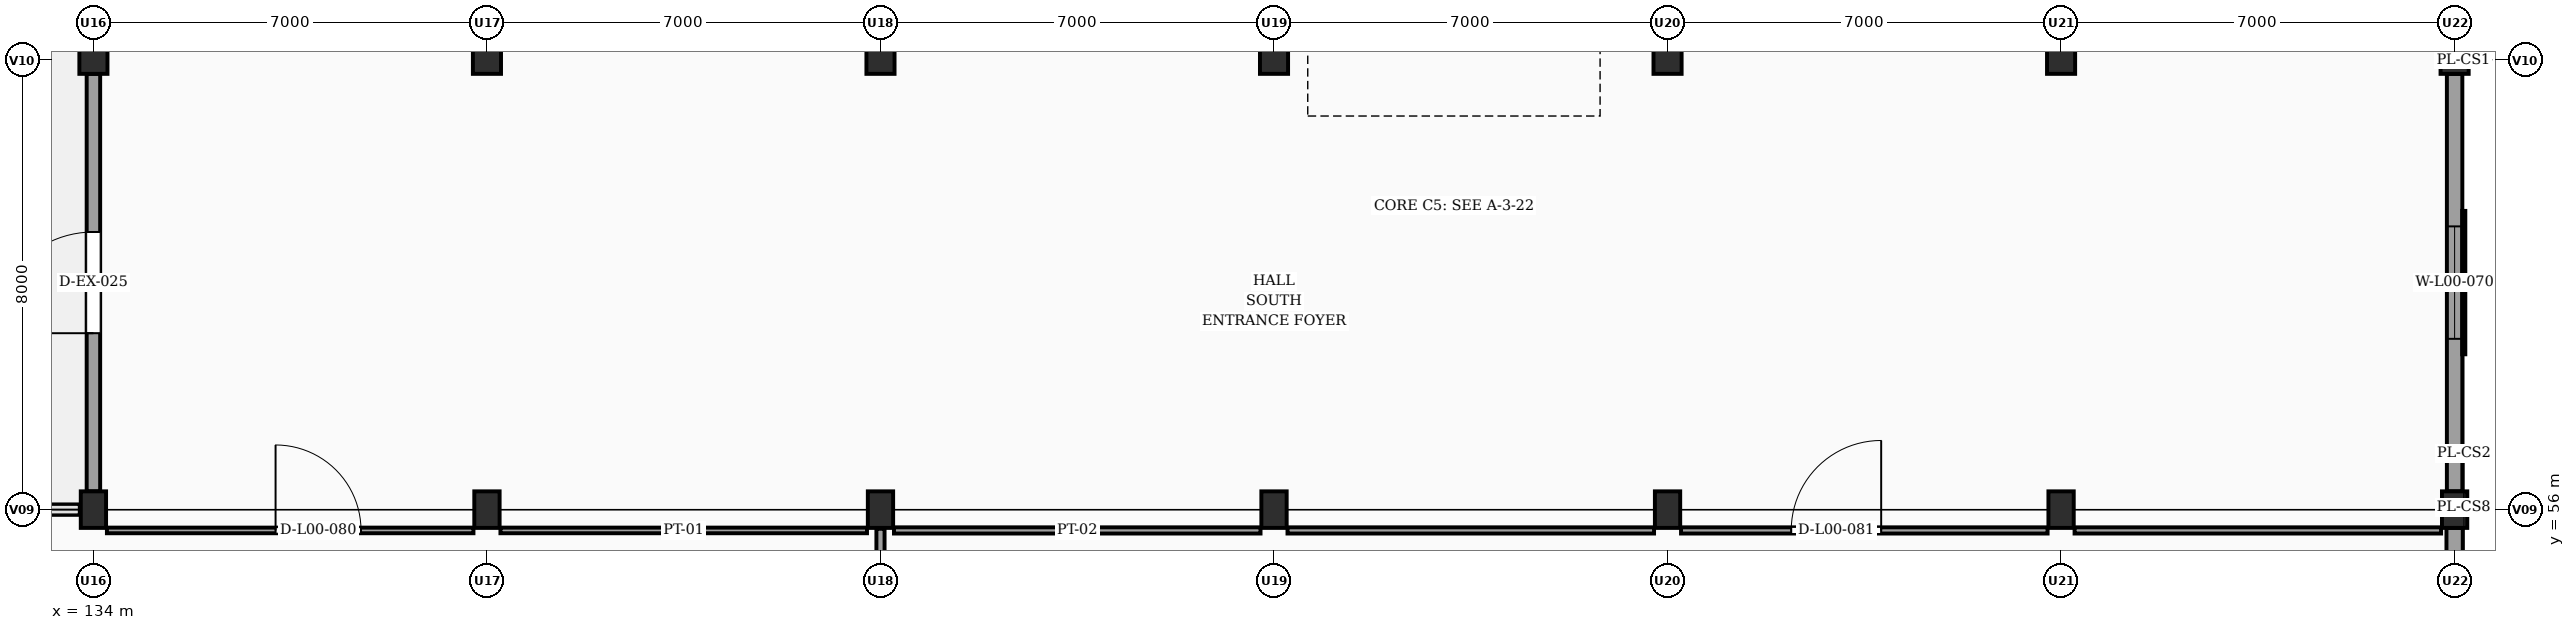
"""IFC4 building model, lengths in metres.
Left out: names, types, materials, properties, quantities, classifications, styles, units other than length and angle.
Written with IfcOpenShell. Run it as: python <this file> out.ifc"""

import sys

from ifc_helpers import new_model, si_unit, direction, frame, frame_2d, origin, origin_2d, place, context, subcontext, project, spatial, rectangle, extrude, element, fill, save


model = new_model("IFC4")
c1 = context("Model", 3, precision=1e-05, world=origin(), true_north=direction((0.0, 1.0)))
c2 = subcontext(c1, "Body", "Model", "MODEL_VIEW")
j1 = project(units=[si_unit("LENGTHUNIT", "METRE"), si_unit("PLANEANGLEUNIT", "RADIAN")], contexts=[c1])
p1 = place(None, origin())
s1 = spatial("IfcSite", under=j1, at=p1, CompositionType="ELEMENT")
p2 = place(p1, origin())
s2 = spatial("IfcBuilding", under=s1, at=p2, CompositionType="ELEMENT")
p3 = place(p2, origin())
s3 = spatial("IfcBuildingStorey", under=s2, at=p3, CompositionType="ELEMENT", Elevation=0.0)
p4 = place(p3, frame((134.0, 56.0, -0.2), z_axis=(0.0, 0.0, 1.0), x_axis=(1.0, 0.0, 0.0)))
e1 = element("IfcColumn", 1, at=p4, inside=s3, PredefinedType="COLUMN", context=c2, shape_type="SweptSolid", body=[
    extrude(rectangle(XDim=0.45, YDim=0.65, at=origin_2d()), origin(), (0.0, 0.0, 1.0), 4.7),
])
p5 = place(p3, frame((134.0, 64.0, -0.2), z_axis=(0.0, 0.0, 1.0), x_axis=(1.0, 0.0, 0.0)))
e2 = element("IfcColumn", 2, at=p5, inside=s3, PredefinedType="COLUMN", context=c2, shape_type="SweptSolid", body=[
    extrude(rectangle(XDim=0.5, YDim=0.5, at=origin_2d()), origin(), (0.0, 0.0, 1.0), 4.7),
])
p6 = place(p3, frame((141.0, 56.0, -0.2), z_axis=(0.0, 0.0, 1.0), x_axis=(1.0, 0.0, 0.0)))
e3 = element("IfcColumn", 3, at=p6, inside=s3, PredefinedType="COLUMN", context=c2, shape_type="SweptSolid", body=[
    extrude(rectangle(XDim=0.45, YDim=0.65, at=origin_2d()), origin(), (0.0, 0.0, 1.0), 4.7),
])
p7 = place(p3, frame((141.0, 64.0, -0.2), z_axis=(0.0, 0.0, 1.0), x_axis=(1.0, 0.0, 0.0)))
e4 = element("IfcColumn", 4, at=p7, inside=s3, PredefinedType="COLUMN", context=c2, shape_type="SweptSolid", body=[
    extrude(rectangle(XDim=0.5, YDim=0.5, at=origin_2d()), origin(), (0.0, 0.0, 1.0), 4.7),
])
p8 = place(p3, frame((148.0, 56.0, -0.2), z_axis=(0.0, 0.0, 1.0), x_axis=(1.0, 0.0, 0.0)))
e5 = element("IfcColumn", 5, at=p8, inside=s3, PredefinedType="COLUMN", context=c2, shape_type="SweptSolid", body=[
    extrude(rectangle(XDim=0.45, YDim=0.65, at=origin_2d()), origin(), (0.0, 0.0, 1.0), 4.7),
])
p9 = place(p3, frame((148.0, 64.0, -0.2), z_axis=(0.0, 0.0, 1.0), x_axis=(1.0, 0.0, 0.0)))
e6 = element("IfcColumn", 6, at=p9, inside=s3, PredefinedType="COLUMN", context=c2, shape_type="SweptSolid", body=[
    extrude(rectangle(XDim=0.5, YDim=0.5, at=origin_2d()), origin(), (0.0, 0.0, 1.0), 4.7),
])
p10 = place(p3, frame((155.0, 56.0, -0.2), z_axis=(0.0, 0.0, 1.0), x_axis=(1.0, 0.0, 0.0)))
e7 = element("IfcColumn", 7, at=p10, inside=s3, PredefinedType="COLUMN", context=c2, shape_type="SweptSolid", body=[
    extrude(rectangle(XDim=0.45, YDim=0.65, at=origin_2d()), origin(), (0.0, 0.0, 1.0), 4.7),
])
p11 = place(p3, frame((155.0, 64.0, -0.2), z_axis=(0.0, 0.0, 1.0), x_axis=(1.0, 0.0, 0.0)))
e8 = element("IfcColumn", 8, at=p11, inside=s3, PredefinedType="COLUMN", context=c2, shape_type="SweptSolid", body=[
    extrude(rectangle(XDim=0.5, YDim=0.5, at=origin_2d()), origin(), (0.0, 0.0, 1.0), 4.7),
])
p12 = place(p3, frame((162.0, 56.0, -0.2), z_axis=(0.0, 0.0, 1.0), x_axis=(1.0, 0.0, 0.0)))
e9 = element("IfcColumn", 9, at=p12, inside=s3, PredefinedType="COLUMN", context=c2, shape_type="SweptSolid", body=[
    extrude(rectangle(XDim=0.45, YDim=0.65, at=origin_2d()), origin(), (0.0, 0.0, 1.0), 4.7),
])
p13 = place(p3, frame((162.0, 64.0, -0.2), z_axis=(0.0, 0.0, 1.0), x_axis=(1.0, 0.0, 0.0)))
e10 = element("IfcColumn", 10, at=p13, inside=s3, PredefinedType="COLUMN", context=c2, shape_type="SweptSolid", body=[
    extrude(rectangle(XDim=0.5, YDim=0.5, at=origin_2d()), origin(), (0.0, 0.0, 1.0), 4.7),
])
p14 = place(p3, frame((169.0, 56.0, -0.2), z_axis=(0.0, 0.0, 1.0), x_axis=(1.0, 0.0, 0.0)))
e11 = element("IfcColumn", 11, at=p14, inside=s3, PredefinedType="COLUMN", context=c2, shape_type="SweptSolid", body=[
    extrude(rectangle(XDim=0.45, YDim=0.65, at=origin_2d()), origin(), (0.0, 0.0, 1.0), 4.7),
])
p15 = place(p3, frame((169.0, 64.0, -0.2), z_axis=(0.0, 0.0, 1.0), x_axis=(1.0, 0.0, 0.0)))
e12 = element("IfcColumn", 12, at=p15, inside=s3, PredefinedType="COLUMN", context=c2, shape_type="SweptSolid", body=[
    extrude(rectangle(XDim=0.5, YDim=0.5, at=origin_2d()), origin(), (0.0, 0.0, 1.0), 4.7),
])
p16 = place(p3, frame((176.0, 56.0, -0.2), z_axis=(0.0, 0.0, 1.0), x_axis=(1.0, 0.0, 0.0)))
e13 = element("IfcColumn", 13, at=p16, inside=s3, PredefinedType="COLUMN", context=c2, shape_type="SweptSolid", body=[
    extrude(rectangle(XDim=0.45, YDim=0.65, at=origin_2d()), origin(), (0.0, 0.0, 1.0), 4.7),
])
p17 = place(p3, frame((176.0, 64.0, -0.2), z_axis=(0.0, 0.0, 1.0), x_axis=(1.0, 0.0, 0.0)))
e14 = element("IfcColumn", 14, at=p17, inside=s3, PredefinedType="COLUMN", context=c2, shape_type="SweptSolid", body=[
    extrude(rectangle(XDim=0.5, YDim=0.5, at=origin_2d()), origin(), (0.0, 0.0, 1.0), 4.7),
])
p18 = place(p3, frame((176.0, 55.675, 0.0), z_axis=(0.0, 0.0, 1.0), x_axis=(0.0, -1.0, 0.0)))
e15 = element("IfcWall", 15, at=p18, inside=s3, PredefinedType="SOLIDWALL", context=c2, shape_type="SweptSolid", body=[
    extrude(rectangle(XDim=5.35, YDim=0.29, at=frame_2d((2.675, 0.0))), origin(), (0.0, 0.0, 1.0), 3.54),
])
p19 = place(p18, frame((1.7, 0.0, 0.95)))
e16 = element("IfcOpeningElement", 16, at=p19, cuts=e15, PredefinedType="OPENING", context=c2, shape_type="SweptSolid", body=[
    extrude(rectangle(XDim=1.95, YDim=1.4, at=frame_2d((0.975, 0.7))), frame((0.0, 0.155, 0.0), z_axis=(0.0, -1.0, 0.0), x_axis=(1.0, 0.0, 0.0)), (0.0, 0.0, 1.0), 0.31),
])
p20 = place(p3, frame((127.225, 56.0, 0.0), z_axis=(0.0, 0.0, 1.0), x_axis=(1.0, 0.0, 0.0)))
e17 = element("IfcWall", 17, at=p20, inside=s3, PredefinedType="SOLIDWALL", context=c2, shape_type="SweptSolid", body=[
    extrude(rectangle(XDim=6.55, YDim=0.185, at=frame_2d((3.275, 0.0))), origin(), (0.0, 0.0, 1.0), 0.95),
])
p21 = place(p3, frame((134.0, 56.325, 0.0), z_axis=(0.0, 0.0, 1.0), x_axis=(0.0, 1.0, 0.0)))
e18 = element("IfcWall", 18, at=p21, inside=s3, PredefinedType="SOLIDWALL", context=c2, shape_type="SweptSolid", body=[
    extrude(rectangle(XDim=7.425, YDim=0.24, at=frame_2d((3.712, 0.0))), origin(), (0.0, 0.0, 1.0), 3.565),
])
p22 = place(p21, frame((2.812, 0.0, 0.0)))
e19 = element("IfcOpeningElement", 19, at=p22, cuts=e18, PredefinedType="OPENING", context=c2, shape_type="SweptSolid", body=[
    extrude(rectangle(XDim=1.8, YDim=2.2, at=frame_2d((0.9, 1.1))), frame((0.0, 0.13, 0.0), z_axis=(0.0, -1.0, 0.0), x_axis=(1.0, 0.0, 0.0)), (0.0, 0.0, 1.0), 0.26),
])
p23 = place(p3, frame((176.0, 63.75, 0.0), z_axis=(0.0, 0.0, 1.0), x_axis=(0.0, -1.0, 0.0)))
e20 = element("IfcWall", 20, at=p23, inside=s3, PredefinedType="SOLIDWALL", context=c2, shape_type="SweptSolid", body=[
    extrude(rectangle(XDim=7.425, YDim=0.275, at=frame_2d((3.712, 0.0))), origin(), (0.0, 0.0, 1.0), 3.515),
])
p24 = place(p23, frame((2.712, 0.0, 0.95)))
e21 = element("IfcOpeningElement", 21, at=p24, cuts=e20, PredefinedType="OPENING", context=c2, shape_type="SweptSolid", body=[
    extrude(rectangle(XDim=2.0, YDim=1.5, at=frame_2d((1.0, 0.75))), frame((0.0, 0.147, 0.0), z_axis=(0.0, -1.0, 0.0), x_axis=(1.0, 0.0, 0.0)), (0.0, 0.0, 1.0), 0.295),
])
p25 = place(p3, frame((148.0, 50.0, 0.0), z_axis=(0.0, 0.0, 1.0), x_axis=(0.0, 1.0, 0.0)))
e22 = element("IfcWall", 22, at=p25, inside=s3, PredefinedType="MOVABLE", context=c2, shape_type="SweptSolid", body=[
    extrude(rectangle(XDim=5.66, YDim=0.145, at=frame_2d((2.83, 0.0))), origin(), (0.0, 0.0, 1.0), 8.8),
])
p26 = place(p3, frame((134.24, 55.63, 0.0), z_axis=(0.0, 0.0, 1.0), x_axis=(1.0, 0.0, 0.0)))
e23 = element("IfcWall", 23, at=p26, inside=s3, PredefinedType="PARTITIONING", context=c2, shape_type="SweptSolid", body=[
    extrude(rectangle(XDim=6.52, YDim=0.1, at=frame_2d((3.26, 0.0))), origin(), (0.0, 0.0, 1.0), 3.565),
])
p27 = place(p26, frame((3.0, 0.0, 0.0)))
e24 = element("IfcOpeningElement", 24, at=p27, cuts=e23, PredefinedType="OPENING", context=c2, shape_type="SweptSolid", body=[
    extrude(rectangle(XDim=1.52, YDim=2.2, at=frame_2d((0.76, 1.1))), frame((0.0, 0.06, 0.0), z_axis=(0.0, -1.0, 0.0), x_axis=(1.0, 0.0, 0.0)), (0.0, 0.0, 1.0), 0.12),
])
p28 = place(p3, frame((141.24, 55.63, 0.0), z_axis=(0.0, 0.0, 1.0), x_axis=(1.0, 0.0, 0.0)))
e25 = element("IfcWall", 25, at=p28, inside=s3, PredefinedType="PARTITIONING", context=c2, shape_type="SweptSolid", body=[
    extrude(rectangle(XDim=6.52, YDim=0.1, at=frame_2d((3.26, 0.0))), origin(), (0.0, 0.0, 1.0), 3.565),
])
for number, where, z_axis, x_axis in (
    (26, (148.24, 55.63, 0.0), (0.0, 0.0, 1.0), (1.0, 0.0, 0.0)),
    (27, (155.24, 55.63, 0.0), (0.0, 0.0, 1.0), (1.0, 0.0, 0.0)),
):
    element("IfcWall", number, at=place(p3, frame(where, z_axis=z_axis, x_axis=x_axis)), inside=s3, PredefinedType="PARTITIONING", context=c2, shape_type="SweptSolid", body=[
        extrude(rectangle(XDim=6.52, YDim=0.11, at=frame_2d((3.26, 0.0))), origin(), (0.0, 0.0, 1.0), 3.565),
    ])
p29 = place(p3, frame((162.24, 55.63, 0.0), z_axis=(0.0, 0.0, 1.0), x_axis=(1.0, 0.0, 0.0)))
e28 = element("IfcWall", 28, at=p29, inside=s3, PredefinedType="PARTITIONING", context=c2, shape_type="SweptSolid", body=[
    extrude(rectangle(XDim=6.52, YDim=0.11, at=frame_2d((3.26, 0.0))), origin(), (0.0, 0.0, 1.0), 3.565),
])
p30 = place(p29, frame((1.96, 0.0, 0.0)))
e29 = element("IfcOpeningElement", 29, at=p30, cuts=e28, PredefinedType="OPENING", context=c2, shape_type="SweptSolid", body=[
    extrude(rectangle(XDim=1.6, YDim=2.2, at=frame_2d((0.8, 1.1))), frame((0.0, 0.065, 0.0), z_axis=(0.0, -1.0, 0.0), x_axis=(1.0, 0.0, 0.0)), (0.0, 0.0, 1.0), 0.13),
])
p31 = place(p3, frame((169.24, 55.63, 0.0), z_axis=(0.0, 0.0, 1.0), x_axis=(1.0, 0.0, 0.0)))
e30 = element("IfcWall", 30, at=p31, inside=s3, PredefinedType="PARTITIONING", context=c2, shape_type="SweptSolid", body=[
    extrude(rectangle(XDim=6.52, YDim=0.11, at=frame_2d((3.26, 0.0))), origin(), (0.0, 0.0, 1.0), 3.565),
])
p32 = place(p22, origin())
e31 = element("IfcDoor", 31, at=p32, inside=s3, OperationType="SINGLE_SWING_LEFT", PredefinedType="DOOR", context=c2, shape_type="SweptSolid", body=[
    extrude(rectangle(XDim=1.8, YDim=2.2, at=frame_2d((0.9, 1.1))), frame((0.0, 0.025, 0.0), z_axis=(0.0, -1.0, 0.0), x_axis=(1.0, 0.0, 0.0)), (0.0, 0.0, 1.0), 0.05),
])
fill(e19, e31)
p33 = place(p24, origin())
e32 = element("IfcWindow", 32, at=p33, inside=s3, PartitioningType="DOUBLE_PANEL_VERTICAL", PredefinedType="WINDOW", context=c2, shape_type="SweptSolid", body=[
    extrude(rectangle(XDim=2.0, YDim=1.5, at=frame_2d((1.0, 0.75))), frame((0.0, 0.03, 0.0), z_axis=(0.0, -1.0, 0.0), x_axis=(1.0, 0.0, 0.0)), (0.0, 0.0, 1.0), 0.06),
])
fill(e21, e32)
p34 = place(p27, origin())
e33 = element("IfcDoor", 33, at=p34, inside=s3, OperationType="SINGLE_SWING_LEFT", PredefinedType="DOOR", context=c2, shape_type="SweptSolid", body=[
    extrude(rectangle(XDim=1.52, YDim=2.2, at=frame_2d((0.76, 1.1))), frame((0.0, 0.025, 0.0), z_axis=(0.0, -1.0, 0.0), x_axis=(1.0, 0.0, 0.0)), (0.0, 0.0, 1.0), 0.05),
])
fill(e24, e33)
p35 = place(p30, origin())
e34 = element("IfcDoor", 34, at=p35, inside=s3, OperationType="SINGLE_SWING_RIGHT", PredefinedType="DOOR", context=c2, shape_type="SweptSolid", body=[
    extrude(rectangle(XDim=1.6, YDim=2.2, at=frame_2d((0.8, 1.1))), frame((0.0, 0.025, 0.0), z_axis=(0.0, -1.0, 0.0), x_axis=(1.0, 0.0, 0.0)), (0.0, 0.0, 1.0), 0.05),
])
fill(e29, e34)
save(model, sys.argv[1])
